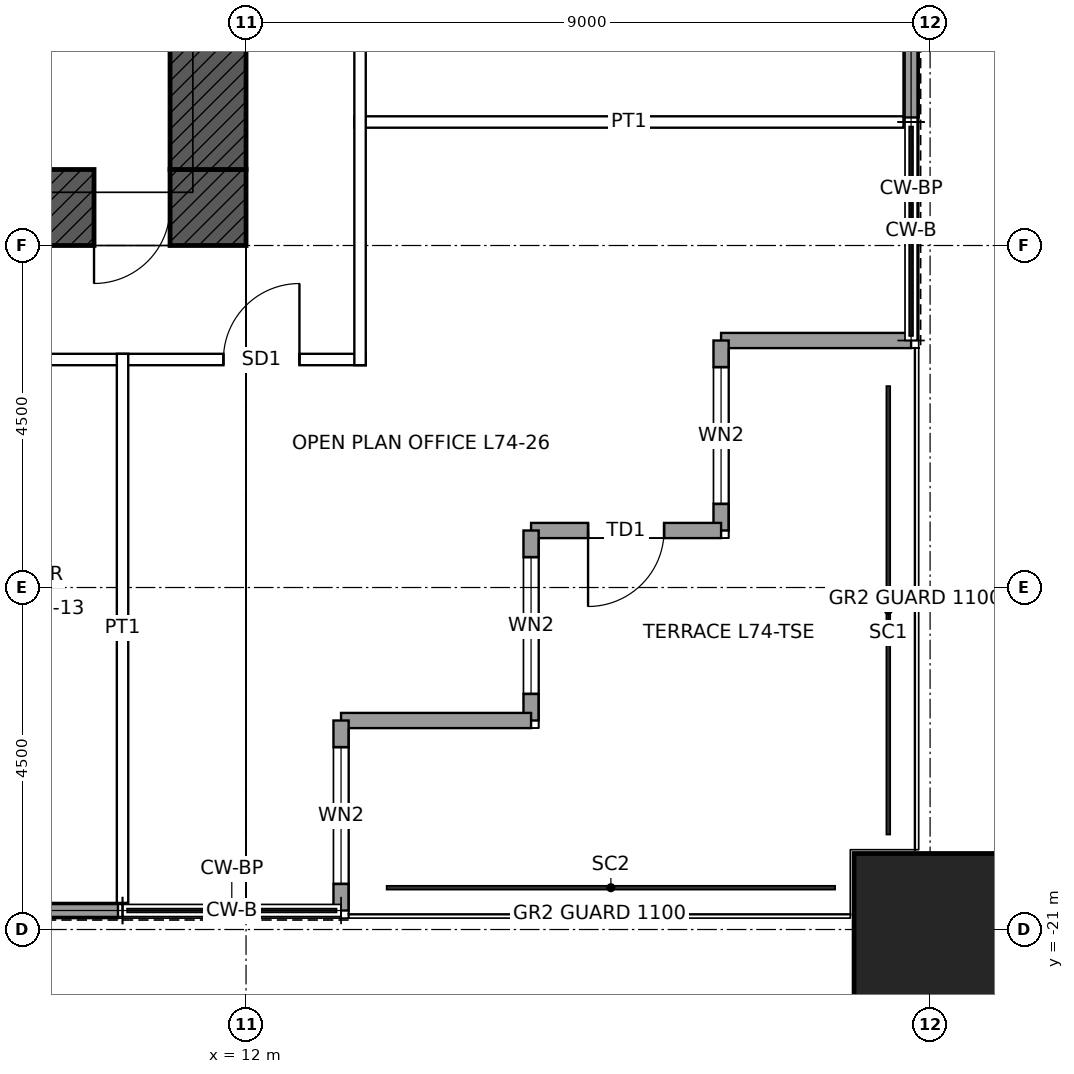
"""IFC4 building model, lengths in metres.
Left out: names, types, materials, properties, quantities, classifications, styles, units other than length and angle.
Written with IfcOpenShell. Run it as: python <this file> out.ifc"""

import sys

from ifc_helpers import new_model, si_unit, direction, frame, frame_2d, origin, origin_2d, place, context, subcontext, project, spatial, rectangle, hollow_rectangle, extrude, element, fill, save


model = new_model("IFC4")
c1 = context("Model", 3, precision=1e-05, world=origin(), true_north=direction((0.0, 1.0)))
c2 = subcontext(c1, "Body", "Model", "MODEL_VIEW")
j1 = project(units=[si_unit("LENGTHUNIT", "METRE"), si_unit("PLANEANGLEUNIT", "RADIAN")], contexts=[c1])
p1 = place(None, origin())
s1 = spatial("IfcSite", under=j1, at=p1, CompositionType="ELEMENT")
p2 = place(p1, origin())
s2 = spatial("IfcBuilding", under=s1, at=p2, CompositionType="ELEMENT")
p3 = place(p2, frame((0.0, 0.0, 331.9)))
s3 = spatial("IfcBuildingStorey", under=s2, at=p3, CompositionType="ELEMENT", Elevation=331.9)
p4 = place(p3, frame((21.0, -21.0, 0.0), z_axis=(0.0, 0.0, 1.0), x_axis=(1.0, 0.0, 0.0)))
e1 = element("IfcColumn", 1, at=p4, inside=s3, PredefinedType="COLUMN", context=c2, shape_type="SweptSolid", body=[
    extrude(hollow_rectangle(XDim=2.0, YDim=2.0, WallThickness=0.095, at=origin_2d()), origin(), (0.0, 0.0, 1.0), 4.0),
])
p5 = place(p3, frame((12.0, -11.5, 0.0), z_axis=(0.0, 0.0, 1.0), x_axis=(-1.0, 0.0, 0.0)))
e2 = element("IfcWall", 2, at=p5, inside=s3, PredefinedType="SHEAR", context=c2, shape_type="SweptSolid", body=[
    extrude(rectangle(XDim=24.0, YDim=1.0, at=frame_2d((12.0, 0.0))), origin(), (0.0, 0.0, 1.0), 4.0),
])
p6 = place(p5, frame((11.5, 0.0, 0.0)))
e3 = element("IfcOpeningElement", 3, at=p6, cuts=e2, PredefinedType="OPENING", context=c2, shape_type="SweptSolid", body=[
    extrude(rectangle(XDim=1.0, YDim=2.1, at=frame_2d((0.5, 1.05))), frame((0.0, 0.51, 0.0), z_axis=(0.0, -1.0, 0.0), x_axis=(1.0, 0.0, 0.0)), (0.0, 0.0, 1.0), 1.02),
])
p7 = place(p5, frame((1.0, 0.0, 0.0)))
e4 = element("IfcOpeningElement", 4, at=p7, cuts=e2, PredefinedType="OPENING", context=c2, shape_type="SweptSolid", body=[
    extrude(rectangle(XDim=1.0, YDim=2.4, at=frame_2d((0.5, 1.2))), frame((0.0, 0.51, 0.0), z_axis=(0.0, -1.0, 0.0), x_axis=(1.0, 0.0, 0.0)), (0.0, 0.0, 1.0), 1.02),
])
p8 = place(p3, frame((11.5, 11.0, 0.0), z_axis=(0.0, 0.0, 1.0), x_axis=(0.0, -1.0, 0.0)))
e5 = element("IfcWall", 5, at=p8, inside=s3, PredefinedType="SHEAR", context=c2, shape_type="SweptSolid", body=[
    extrude(rectangle(XDim=22.0, YDim=1.0, at=frame_2d((11.0, 0.0))), origin(), (0.0, 0.0, 1.0), 4.0),
])
p9 = place(p8, frame((10.5, 0.0, 0.0)))
e6 = element("IfcOpeningElement", 6, at=p9, cuts=e5, PredefinedType="OPENING", context=c2, shape_type="SweptSolid", body=[
    extrude(rectangle(XDim=1.0, YDim=2.4, at=frame_2d((0.5, 1.2))), frame((0.0, 0.51, 0.0), z_axis=(0.0, -1.0, 0.0), x_axis=(1.0, 0.0, 0.0)), (0.0, 0.0, 1.0), 1.02),
])
p10 = place(p3, frame((20.75, -13.25, 0.0), z_axis=(0.0, 0.0, 1.0), x_axis=(-1.0, 0.0, 0.0)))
e7 = element("IfcWall", 7, at=p10, inside=s3, PredefinedType="SOLIDWALL", context=c2, shape_type="SweptSolid", body=[
    extrude(rectangle(XDim=2.5, YDim=0.2, at=frame_2d((1.25, 0.0))), origin(), (0.0, 0.0, 1.0), 3.8),
])
p11 = place(p3, frame((18.25, -13.25, 0.0), z_axis=(0.0, 0.0, 1.0), x_axis=(0.0, -1.0, 0.0)))
e8 = element("IfcWall", 8, at=p11, inside=s3, PredefinedType="SOLIDWALL", context=c2, shape_type="SweptSolid", body=[
    extrude(rectangle(XDim=2.5, YDim=0.2, at=frame_2d((1.25, 0.0))), origin(), (0.0, 0.0, 1.0), 3.8),
])
p12 = place(p11, frame((0.35, 0.0, 0.3)))
e9 = element("IfcOpeningElement", 9, at=p12, cuts=e8, PredefinedType="OPENING", context=c2, shape_type="SweptSolid", body=[
    extrude(rectangle(XDim=1.8, YDim=2.4, at=frame_2d((0.9, 1.2))), frame((0.0, 0.11, 0.0), z_axis=(0.0, -1.0, 0.0), x_axis=(1.0, 0.0, 0.0)), (0.0, 0.0, 1.0), 0.22),
])
p13 = place(p3, frame((18.25, -15.75, 0.0), z_axis=(0.0, 0.0, 1.0), x_axis=(-1.0, 0.0, 0.0)))
e10 = element("IfcWall", 10, at=p13, inside=s3, PredefinedType="SOLIDWALL", context=c2, shape_type="SweptSolid", body=[
    extrude(rectangle(XDim=2.5, YDim=0.2, at=frame_2d((1.25, 0.0))), origin(), (0.0, 0.0, 1.0), 2.888),
])
p14 = place(p13, frame((0.75, 0.0, 0.0)))
e11 = element("IfcOpeningElement", 11, at=p14, cuts=e10, PredefinedType="OPENING", context=c2, shape_type="SweptSolid", body=[
    extrude(rectangle(XDim=1.0, YDim=2.4, at=frame_2d((0.5, 1.2))), frame((0.0, 0.11, 0.0), z_axis=(0.0, -1.0, 0.0), x_axis=(1.0, 0.0, 0.0)), (0.0, 0.0, 1.0), 0.22),
])
p15 = place(p3, frame((15.75, -15.75, 0.0), z_axis=(0.0, 0.0, 1.0), x_axis=(0.0, -1.0, 0.0)))
e12 = element("IfcWall", 12, at=p15, inside=s3, PredefinedType="SOLIDWALL", context=c2, shape_type="SweptSolid", body=[
    extrude(rectangle(XDim=2.5, YDim=0.2, at=frame_2d((1.25, 0.0))), origin(), (0.0, 0.0, 1.0), 3.8),
])
p16 = place(p15, frame((0.35, 0.0, 0.3)))
e13 = element("IfcOpeningElement", 13, at=p16, cuts=e12, PredefinedType="OPENING", context=c2, shape_type="SweptSolid", body=[
    extrude(rectangle(XDim=1.8, YDim=2.4, at=frame_2d((0.9, 1.2))), frame((0.0, 0.11, 0.0), z_axis=(0.0, -1.0, 0.0), x_axis=(1.0, 0.0, 0.0)), (0.0, 0.0, 1.0), 0.22),
])
p17 = place(p3, frame((15.75, -18.25, 0.0), z_axis=(0.0, 0.0, 1.0), x_axis=(-1.0, 0.0, 0.0)))
e14 = element("IfcWall", 14, at=p17, inside=s3, PredefinedType="SOLIDWALL", context=c2, shape_type="SweptSolid", body=[
    extrude(rectangle(XDim=2.5, YDim=0.2, at=frame_2d((1.25, 0.0))), origin(), (0.0, 0.0, 1.0), 3.8),
])
p18 = place(p3, frame((13.25, -18.25, 0.0), z_axis=(0.0, 0.0, 1.0), x_axis=(0.0, -1.0, 0.0)))
e15 = element("IfcWall", 15, at=p18, inside=s3, PredefinedType="SOLIDWALL", context=c2, shape_type="SweptSolid", body=[
    extrude(rectangle(XDim=2.5, YDim=0.2, at=frame_2d((1.25, 0.0))), origin(), (0.0, 0.0, 1.0), 3.8),
])
p19 = place(p18, frame((0.35, 0.0, 0.3)))
e16 = element("IfcOpeningElement", 16, at=p19, cuts=e15, PredefinedType="OPENING", context=c2, shape_type="SweptSolid", body=[
    extrude(rectangle(XDim=1.8, YDim=2.4, at=frame_2d((0.9, 1.2))), frame((0.0, 0.11, 0.0), z_axis=(0.0, -1.0, 0.0), x_axis=(1.0, 0.0, 0.0)), (0.0, 0.0, 1.0), 0.22),
])
for number, where, z_axis, x_axis in (
    (17, (20.75, -7.56, 0.0), (0.0, 0.0, 1.0), (0.0, -1.0, 0.0)),
    (18, (10.315, -20.75, 0.0), (0.0, 0.0, 1.0), (-1.0, 0.0, 0.0)),
):
    element("IfcWall", number, at=place(p3, frame(where, z_axis=z_axis, x_axis=x_axis)), inside=s3, PredefinedType="SOLIDWALL", context=c2, shape_type="SweptSolid", body=[
        extrude(rectangle(XDim=2.755, YDim=0.2, at=frame_2d((1.377, 0.0))), origin(), (0.0, 0.0, 1.0), 3.8),
    ])
p20 = place(p3, frame((-13.575, -13.5, 0.0), z_axis=(0.0, 0.0, 1.0), x_axis=(1.0, 0.0, 0.0)))
e19 = element("IfcWall", 19, at=p20, inside=s3, PredefinedType="PARTITIONING", context=c2, shape_type="SweptSolid", body=[
    extrude(rectangle(XDim=27.15, YDim=0.15, at=frame_2d((13.575, 0.0))), origin(), (0.0, 0.0, 1.0), 3.8),
])
p21 = place(p20, frame((21.475, 0.0, 0.0)))
e20 = element("IfcOpeningElement", 20, at=p21, cuts=e19, PredefinedType="OPENING", context=c2, shape_type="SweptSolid", body=[
    extrude(rectangle(XDim=1.0, YDim=2.4, at=frame_2d((0.5, 1.2))), frame((0.0, 0.085, 0.0), z_axis=(0.0, -1.0, 0.0), x_axis=(1.0, 0.0, 0.0)), (0.0, 0.0, 1.0), 0.17),
])
p22 = place(p20, frame((19.325, 0.0, 0.0)))
e21 = element("IfcOpeningElement", 21, at=p22, cuts=e19, PredefinedType="OPENING", context=c2, shape_type="SweptSolid", body=[
    extrude(rectangle(XDim=1.0, YDim=2.4, at=frame_2d((0.5, 1.2))), frame((0.0, 0.085, 0.0), z_axis=(0.0, -1.0, 0.0), x_axis=(1.0, 0.0, 0.0)), (0.0, 0.0, 1.0), 0.17),
])
p23 = place(p20, frame((16.825, 0.0, 0.0)))
e22 = element("IfcOpeningElement", 22, at=p23, cuts=e19, PredefinedType="OPENING", context=c2, shape_type="SweptSolid", body=[
    extrude(rectangle(XDim=1.0, YDim=2.4, at=frame_2d((0.5, 1.2))), frame((0.0, 0.085, 0.0), z_axis=(0.0, -1.0, 0.0), x_axis=(1.0, 0.0, 0.0)), (0.0, 0.0, 1.0), 0.17),
])
p24 = place(p20, frame((14.675, 0.0, 0.0)))
e23 = element("IfcOpeningElement", 23, at=p24, cuts=e19, PredefinedType="OPENING", context=c2, shape_type="SweptSolid", body=[
    extrude(rectangle(XDim=1.0, YDim=2.4, at=frame_2d((0.5, 1.2))), frame((0.0, 0.085, 0.0), z_axis=(0.0, -1.0, 0.0), x_axis=(1.0, 0.0, 0.0)), (0.0, 0.0, 1.0), 0.17),
])
p25 = place(p20, frame((11.475, 0.0, 0.0)))
e24 = element("IfcOpeningElement", 24, at=p25, cuts=e19, PredefinedType="OPENING", context=c2, shape_type="SweptSolid", body=[
    extrude(rectangle(XDim=1.0, YDim=2.4, at=frame_2d((0.5, 1.2))), frame((0.0, 0.085, 0.0), z_axis=(0.0, -1.0, 0.0), x_axis=(1.0, 0.0, 0.0)), (0.0, 0.0, 1.0), 0.17),
])
p26 = place(p20, frame((9.325, 0.0, 0.0)))
e25 = element("IfcOpeningElement", 25, at=p26, cuts=e19, PredefinedType="OPENING", context=c2, shape_type="SweptSolid", body=[
    extrude(rectangle(XDim=1.0, YDim=2.4, at=frame_2d((0.5, 1.2))), frame((0.0, 0.085, 0.0), z_axis=(0.0, -1.0, 0.0), x_axis=(1.0, 0.0, 0.0)), (0.0, 0.0, 1.0), 0.17),
])
p27 = place(p20, frame((6.825, 0.0, 0.0)))
e26 = element("IfcOpeningElement", 26, at=p27, cuts=e19, PredefinedType="OPENING", context=c2, shape_type="SweptSolid", body=[
    extrude(rectangle(XDim=1.0, YDim=2.4, at=frame_2d((0.5, 1.2))), frame((0.0, 0.085, 0.0), z_axis=(0.0, -1.0, 0.0), x_axis=(1.0, 0.0, 0.0)), (0.0, 0.0, 1.0), 0.17),
])
p28 = place(p20, frame((4.137, 0.0, 0.0)))
e27 = element("IfcOpeningElement", 27, at=p28, cuts=e19, PredefinedType="OPENING", context=c2, shape_type="SweptSolid", body=[
    extrude(rectangle(XDim=1.0, YDim=2.4, at=frame_2d((0.5, 1.2))), frame((0.0, 0.085, 0.0), z_axis=(0.0, -1.0, 0.0), x_axis=(1.0, 0.0, 0.0)), (0.0, 0.0, 1.0), 0.17),
])
p29 = place(p20, frame((25.278, 0.0, 0.0)))
e28 = element("IfcOpeningElement", 28, at=p29, cuts=e19, PredefinedType="OPENING", context=c2, shape_type="SweptSolid", body=[
    extrude(rectangle(XDim=1.0, YDim=2.4, at=frame_2d((0.5, 1.2))), frame((0.0, 0.085, 0.0), z_axis=(0.0, -1.0, 0.0), x_axis=(1.0, 0.0, 0.0)), (0.0, 0.0, 1.0), 0.17),
])
p30 = place(p20, frame((1.137, 0.0, 0.0)))
e29 = element("IfcOpeningElement", 29, at=p30, cuts=e19, PredefinedType="OPENING", context=c2, shape_type="SweptSolid", body=[
    extrude(rectangle(XDim=1.0, YDim=2.4, at=frame_2d((0.5, 1.2))), frame((0.0, 0.085, 0.0), z_axis=(0.0, -1.0, 0.0), x_axis=(1.0, 0.0, 0.0)), (0.0, 0.0, 1.0), 0.17),
])
for number, where, z_axis, x_axis in (
    (30, (13.425, -10.375, 0.0), (0.0, 0.0, 1.0), (1.0, 0.0, 0.0)),
    (31, (10.375, -20.65, 0.0), (0.0, 0.0, 1.0), (0.0, 1.0, 0.0)),
):
    element("IfcWall", number, at=place(p3, frame(where, z_axis=z_axis, x_axis=x_axis)), inside=s3, PredefinedType="PARTITIONING", context=c2, shape_type="SweptSolid", body=[
        extrude(rectangle(XDim=7.225, YDim=0.15, at=frame_2d((3.612, 0.0))), origin(), (0.0, 0.0, 1.0), 3.8),
    ])
p31 = place(p3, frame((13.5, -13.575, 0.0), z_axis=(0.0, 0.0, 1.0), x_axis=(0.0, 1.0, 0.0)))
e32 = element("IfcWall", 32, at=p31, inside=s3, PredefinedType="PARTITIONING", context=c2, shape_type="SweptSolid", body=[
    extrude(rectangle(XDim=13.65, YDim=0.15, at=frame_2d((6.825, 0.0))), origin(), (0.0, 0.0, 1.0), 3.8),
])
p32 = place(p31, frame((11.475, 0.0, 0.0)))
e33 = element("IfcOpeningElement", 33, at=p32, cuts=e32, PredefinedType="OPENING", context=c2, shape_type="SweptSolid", body=[
    extrude(rectangle(XDim=1.0, YDim=2.4, at=frame_2d((0.5, 1.2))), frame((0.0, 0.085, 0.0), z_axis=(0.0, -1.0, 0.0), x_axis=(1.0, 0.0, 0.0)), (0.0, 0.0, 1.0), 0.17),
])
p33 = place(p31, frame((9.325, 0.0, 0.0)))
e34 = element("IfcOpeningElement", 34, at=p33, cuts=e32, PredefinedType="OPENING", context=c2, shape_type="SweptSolid", body=[
    extrude(rectangle(XDim=1.0, YDim=2.4, at=frame_2d((0.5, 1.2))), frame((0.0, 0.085, 0.0), z_axis=(0.0, -1.0, 0.0), x_axis=(1.0, 0.0, 0.0)), (0.0, 0.0, 1.0), 0.17),
])
p34 = place(p31, frame((5.387, 0.0, 0.0)))
e35 = element("IfcOpeningElement", 35, at=p34, cuts=e32, PredefinedType="OPENING", context=c2, shape_type="SweptSolid", body=[
    extrude(rectangle(XDim=1.0, YDim=2.4, at=frame_2d((0.5, 1.2))), frame((0.0, 0.085, 0.0), z_axis=(0.0, -1.0, 0.0), x_axis=(1.0, 0.0, 0.0)), (0.0, 0.0, 1.0), 0.17),
])
p35 = place(p12, origin())
e36 = element("IfcWindow", 36, at=p35, inside=s3, PartitioningType="SINGLE_PANEL", PredefinedType="WINDOW", context=c2, shape_type="SweptSolid", body=[
    extrude(rectangle(XDim=1.8, YDim=2.4, at=frame_2d((0.9, 1.2))), frame((0.0, 0.03, 0.0), z_axis=(0.0, -1.0, 0.0), x_axis=(1.0, 0.0, 0.0)), (0.0, 0.0, 1.0), 0.06),
])
fill(e9, e36)
p36 = place(p14, origin())
e37 = element("IfcDoor", 37, at=p36, inside=s3, OperationType="SINGLE_SWING_RIGHT", PredefinedType="DOOR", context=c2, shape_type="SweptSolid", body=[
    extrude(rectangle(XDim=1.0, YDim=2.4, at=frame_2d((0.5, 1.2))), frame((0.0, 0.025, 0.0), z_axis=(0.0, -1.0, 0.0), x_axis=(1.0, 0.0, 0.0)), (0.0, 0.0, 1.0), 0.05),
])
fill(e11, e37)
p37 = place(p16, origin())
e38 = element("IfcWindow", 38, at=p37, inside=s3, PartitioningType="SINGLE_PANEL", PredefinedType="WINDOW", context=c2, shape_type="SweptSolid", body=[
    extrude(rectangle(XDim=1.8, YDim=2.4, at=frame_2d((0.9, 1.2))), frame((0.0, 0.03, 0.0), z_axis=(0.0, -1.0, 0.0), x_axis=(1.0, 0.0, 0.0)), (0.0, 0.0, 1.0), 0.06),
])
fill(e13, e38)
p38 = place(p19, origin())
e39 = element("IfcWindow", 39, at=p38, inside=s3, PartitioningType="SINGLE_PANEL", PredefinedType="WINDOW", context=c2, shape_type="SweptSolid", body=[
    extrude(rectangle(XDim=1.8, YDim=2.4, at=frame_2d((0.9, 1.2))), frame((0.0, 0.03, 0.0), z_axis=(0.0, -1.0, 0.0), x_axis=(1.0, 0.0, 0.0)), (0.0, 0.0, 1.0), 0.06),
])
fill(e16, e39)
p39 = place(p7, origin())
e40 = element("IfcDoor", 40, at=p39, inside=s3, OperationType="SINGLE_SWING_RIGHT", PredefinedType="DOOR", context=c2, shape_type="SweptSolid", body=[
    extrude(rectangle(XDim=1.0, YDim=2.4, at=frame_2d((0.5, 1.2))), frame((0.0, 0.485, 0.0), z_axis=(0.0, -1.0, 0.0), x_axis=(1.0, 0.0, 0.0)), (0.0, 0.0, 1.0), 0.05),
])
fill(e4, e40)
p40 = place(p29, origin())
e41 = element("IfcDoor", 41, at=p40, inside=s3, OperationType="SINGLE_SWING_RIGHT", PredefinedType="DOOR", context=c2, shape_type="SweptSolid", body=[
    extrude(rectangle(XDim=1.0, YDim=2.4, at=frame_2d((0.5, 1.2))), frame((0.0, 0.025, 0.0), z_axis=(0.0, -1.0, 0.0), x_axis=(1.0, 0.0, 0.0)), (0.0, 0.0, 1.0), 0.05),
])
fill(e28, e41)
save(model, sys.argv[1])
